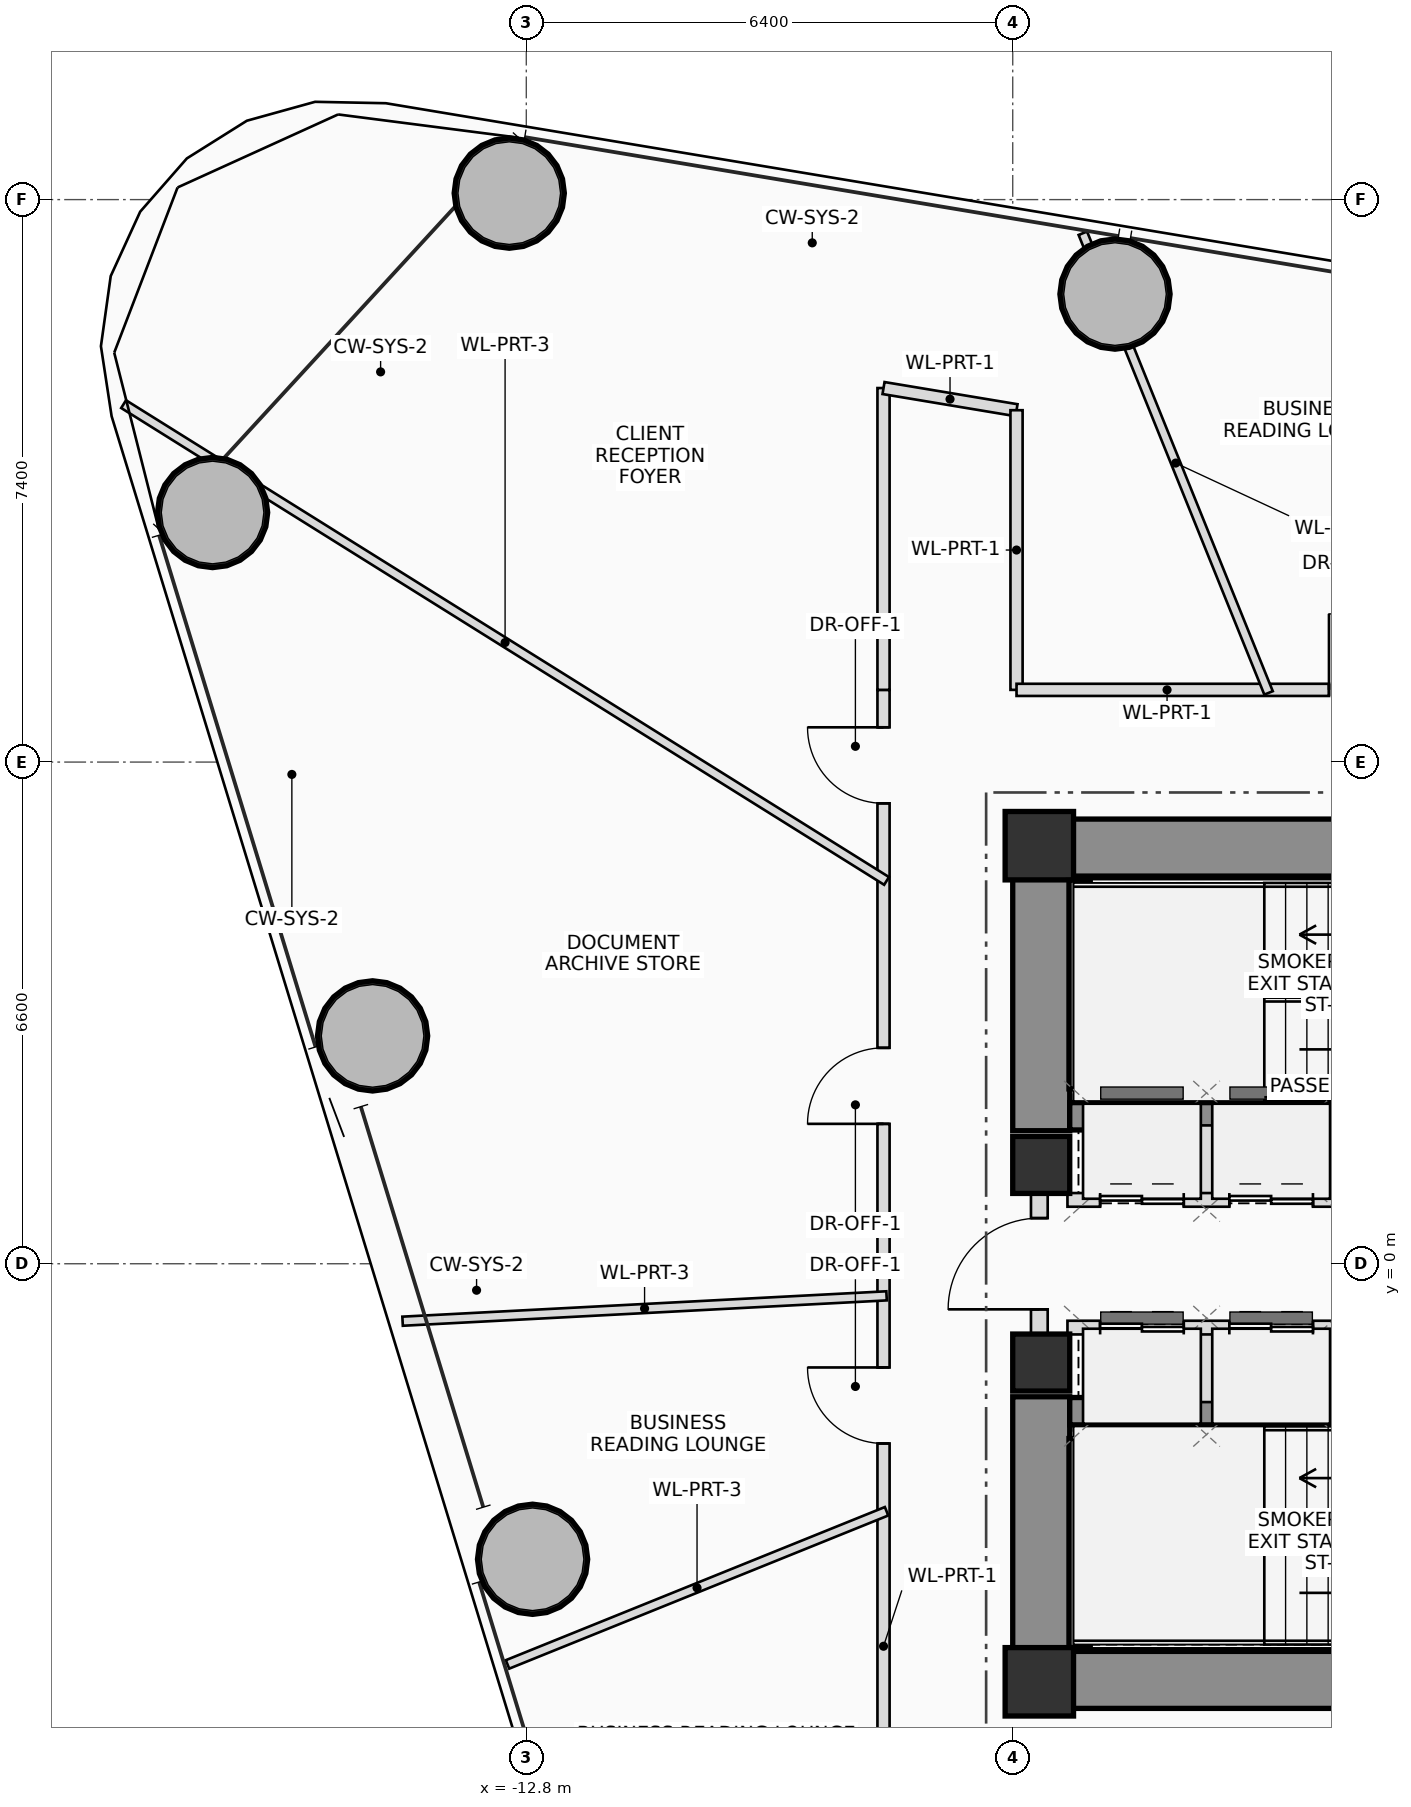
"""IFC4 building model, lengths in metres.
Left out: names, types, materials, properties, quantities, classifications, styles, units other than length and angle.
Written with IfcOpenShell. Run it as: python <this file> out.ifc"""

import sys

from ifc_helpers import new_model, si_unit, direction, frame, frame_2d, origin, origin_2d, place, context, subcontext, project, spatial, rectangle, hollow_circle, extrude, source, transform, mapped, element, fill, save


model = new_model("IFC4")
c1 = context("Model", 3, precision=1e-05, world=origin(), true_north=direction((0.0, 1.0)))
c2 = subcontext(c1, "Body", "Model", "MODEL_VIEW")
j1 = project(units=[si_unit("LENGTHUNIT", "METRE"), si_unit("PLANEANGLEUNIT", "RADIAN")], contexts=[c1])
p1 = place(None, origin())
s1 = spatial("IfcSite", under=j1, at=p1, CompositionType="ELEMENT")
p2 = place(p1, origin())
s2 = spatial("IfcBuilding", under=s1, at=p2, CompositionType="ELEMENT")
p3 = place(p2, frame((0.0, 0.0, 108.65)))
s3 = spatial("IfcBuildingStorey", under=s2, at=p3, CompositionType="ELEMENT", Elevation=108.65)
m1 = source(origin(), c2, "Body", "SweptSolid", [
    extrude(rectangle(XDim=0.9, YDim=0.9, at=origin_2d()), origin(), (0.0, 0.0, 1.0), 3.75),
])
for number, where, z_axis, x_axis in (
    (1, (-6.05, -5.5, 0.0), (0.0, 0.0, 1.0), (1.0, 0.0, 0.0)),
    (2, (-6.05, 5.5, 0.0), (0.0, 0.0, 1.0), (1.0, 0.0, 0.0)),
):
    element("IfcColumn", number, at=place(p3, frame(where, z_axis=z_axis, x_axis=x_axis)), inside=s3, PredefinedType="COLUMN", context=c2, shape_type="MappedRepresentation", body=[
        mapped(m1, transform((0.0, 0.0, 0.0), scale=1.0)),
    ])
p4 = place(p3, frame((-6.4, 5.475, 0.0), z_axis=(0.0, 0.0, 1.0), x_axis=(1.0, 0.0, 0.0)))
e3 = element("IfcWall", 3, at=p4, inside=s3, PredefinedType="SHEAR", context=c2, shape_type="SweptSolid", body=[
    extrude(rectangle(XDim=12.8, YDim=0.75, at=frame_2d((6.4, 0.0))), origin(), (0.0, 0.0, 1.0), 3.75),
])
p5 = place(p4, frame((8.6, 0.0, 0.0)))
e4 = element("IfcOpeningElement", 4, at=p5, cuts=e3, PredefinedType="OPENING", context=c2, shape_type="SweptSolid", body=[
    extrude(rectangle(XDim=1.2, YDim=2.2, at=frame_2d((0.6, 1.1))), frame((0.0, 0.385, 0.0), z_axis=(0.0, -1.0, 0.0), x_axis=(1.0, 0.0, 0.0)), (0.0, 0.0, 1.0), 0.77),
])
p6 = place(p3, frame((-6.4, -5.475, 0.0), z_axis=(0.0, 0.0, 1.0), x_axis=(1.0, 0.0, 0.0)))
e5 = element("IfcWall", 5, at=p6, inside=s3, PredefinedType="SHEAR", context=c2, shape_type="SweptSolid", body=[
    extrude(rectangle(XDim=12.8, YDim=0.75, at=frame_2d((6.4, 0.0))), origin(), (0.0, 0.0, 1.0), 3.75),
])
p7 = place(p6, frame((8.6, 0.0, 0.0)))
e6 = element("IfcOpeningElement", 6, at=p7, cuts=e5, PredefinedType="OPENING", context=c2, shape_type="SweptSolid", body=[
    extrude(rectangle(XDim=1.2, YDim=2.2, at=frame_2d((0.6, 1.1))), frame((0.0, 0.385, 0.0), z_axis=(0.0, -1.0, 0.0), x_axis=(1.0, 0.0, 0.0)), (0.0, 0.0, 1.0), 0.77),
])
for number, where, z_axis, x_axis in (
    (7, (-6.025, -5.1, 0.0), (0.0, 0.0, 1.0), (0.0, 1.0, 0.0)),
    (8, (-6.025, 1.75, 0.0), (0.0, 0.0, 1.0), (0.0, 1.0, 0.0)),
):
    element("IfcWall", number, at=place(p3, frame(where, z_axis=z_axis, x_axis=x_axis)), inside=s3, PredefinedType="SHEAR", context=c2, shape_type="SweptSolid", body=[
        extrude(rectangle(XDim=3.35, YDim=0.75, at=frame_2d((1.675, 0.0))), origin(), (0.0, 0.0, 1.0), 3.75),
    ])
for number, where, z_axis, x_axis in (
    (9, (-5.65, 1.94, 0.0), (0.0, 0.0, 1.0), (1.0, 0.0, 0.0)),
    (10, (-5.65, -1.94, 0.0), (0.0, 0.0, 1.0), (1.0, 0.0, 0.0)),
):
    element("IfcWall", number, at=place(p3, frame(where, z_axis=z_axis, x_axis=x_axis)), inside=s3, PredefinedType="SHEAR", context=c2, shape_type="SweptSolid", body=[
        extrude(rectangle(XDim=11.3, YDim=0.36, at=frame_2d((5.65, 0.0))), origin(), (0.0, 0.0, 1.0), 3.75),
    ])
for number, where, z_axis, x_axis in (
    (11, (-5.52, 2.3, 0.0), (0.0, 0.0, 1.0), (0.0, 1.0, 0.0)),
    (12, (-5.52, -5.05, 0.0), (0.0, 0.0, 1.0), (0.0, 1.0, 0.0)),
):
    element("IfcWall", number, at=place(p3, frame(where, z_axis=z_axis, x_axis=x_axis)), inside=s3, PredefinedType="SHEAR", context=c2, shape_type="SweptSolid", body=[
        extrude(rectangle(XDim=2.75, YDim=0.28, at=frame_2d((1.375, 0.0))), origin(), (0.0, 0.0, 1.0), 3.75),
    ])
m2 = source(origin(), c2, "Body", "SweptSolid", [
    extrude(rectangle(XDim=0.75, YDim=0.75, at=origin_2d()), origin(), (0.0, 0.0, 1.0), 3.75),
])
for number, where, z_axis, x_axis in (
    (13, (-6.025, -1.3, 0.0), (0.0, 0.0, 1.0), (1.0, 0.0, 0.0)),
    (14, (-6.025, 1.3, 0.0), (0.0, 0.0, 1.0), (1.0, 0.0, 0.0)),
):
    element("IfcColumn", number, at=place(p3, frame(where, z_axis=z_axis, x_axis=x_axis)), inside=s3, PredefinedType="COLUMN", context=c2, shape_type="MappedRepresentation", body=[
        mapped(m2, transform((0.0, 0.0, 0.0), scale=1.0)),
    ])
m3 = source(origin(), c2, "Body", "SweptSolid", [
    extrude(hollow_circle(Radius=0.725, WallThickness=0.05, at=origin_2d()), origin(), (0.0, 0.0, 1.0), 3.75),
])
for number, where, z_axis, x_axis in (
    (15, (-5.054, 12.757, 0.0), (0.0, 0.0, 1.0), (1.0, 0.0, 0.0)),
    (16, (-13.024, 14.085, 0.0), (0.0, 0.0, 1.0), (1.0, 0.0, 0.0)),
    (17, (-16.927, 9.883, 0.0), (0.0, 0.0, 1.0), (1.0, 0.0, 0.0)),
    (18, (-14.823, 2.998, 0.0), (0.0, 0.0, 1.0), (1.0, 0.0, 0.0)),
    (19, (-12.717, -3.888, 0.0), (0.0, 0.0, 1.0), (1.0, 0.0, 0.0)),
):
    element("IfcColumn", number, at=place(p3, frame(where, z_axis=z_axis, x_axis=x_axis)), inside=s3, PredefinedType="COLUMN", context=c2, shape_type="MappedRepresentation", body=[
        mapped(m3, transform((0.0, 0.0, 0.0), scale=1.0)),
    ])
p8 = place(p3, frame((-6.05, -0.95, 0.0), z_axis=(0.0, 0.0, 1.0), x_axis=(0.0, 1.0, 0.0)))
e20 = element("IfcWall", 20, at=p8, inside=s3, PredefinedType="PLUMBINGWALL", context=c2, shape_type="SweptSolid", body=[
    extrude(rectangle(XDim=1.9, YDim=0.22, at=frame_2d((0.95, 0.0))), origin(), (0.0, 0.0, 1.0), 2.525),
])
p9 = place(p8, frame((0.35, 0.0, 0.0)))
e21 = element("IfcOpeningElement", 21, at=p9, cuts=e20, PredefinedType="OPENING", context=c2, shape_type="SweptSolid", body=[
    extrude(rectangle(XDim=1.2, YDim=2.2, at=frame_2d((0.6, 1.1))), frame((0.0, 0.12, 0.0), z_axis=(0.0, -1.0, 0.0), x_axis=(1.0, 0.0, 0.0)), (0.0, 0.0, 1.0), 0.24),
])
for number, where, z_axis, x_axis in (
    (22, (-3.85, 0.84, 0.0), (0.0, 0.0, 1.0), (0.0, 1.0, 0.0)),
    (23, (-3.85, -1.82, 0.0), (0.0, 0.0, 1.0), (0.0, 1.0, 0.0)),
):
    element("IfcWall", number, at=place(p3, frame(where, z_axis=z_axis, x_axis=x_axis)), inside=s3, PredefinedType="PLUMBINGWALL", context=c2, shape_type="SweptSolid", body=[
        extrude(rectangle(XDim=0.98, YDim=0.18, at=frame_2d((0.49, 0.0))), origin(), (0.0, 0.0, 1.0), 3.545),
    ])
p10 = place(p3, frame((-5.68, 0.84, 0.0), z_axis=(0.0, 0.0, 1.0), x_axis=(1.0, 0.0, 0.0)))
e24 = element("IfcWall", 24, at=p10, inside=s3, PredefinedType="PLUMBINGWALL", context=c2, shape_type="SweptSolid", body=[
    extrude(rectangle(XDim=11.33, YDim=0.18, at=frame_2d((5.665, 0.0))), origin(), (0.0, 0.0, 1.0), 3.545),
])
p11 = place(p10, frame((0.43, 0.0, 0.0)))
e25 = element("IfcOpeningElement", 25, at=p11, cuts=e24, PredefinedType="OPENING", context=c2, shape_type="SweptSolid", body=[
    extrude(rectangle(XDim=1.1, YDim=2.2, at=frame_2d((0.55, 1.1))), frame((0.0, 0.1, 0.0), z_axis=(0.0, -1.0, 0.0), x_axis=(1.0, 0.0, 0.0)), (0.0, 0.0, 1.0), 0.2),
])
p12 = place(p10, frame((2.13, 0.0, 0.0)))
e26 = element("IfcOpeningElement", 26, at=p12, cuts=e24, PredefinedType="OPENING", context=c2, shape_type="SweptSolid", body=[
    extrude(rectangle(XDim=1.1, YDim=2.2, at=frame_2d((0.55, 1.1))), frame((0.0, 0.1, 0.0), z_axis=(0.0, -1.0, 0.0), x_axis=(1.0, 0.0, 0.0)), (0.0, 0.0, 1.0), 0.2),
])
p13 = place(p10, frame((10.25, 0.0, 0.0)))
e27 = element("IfcOpeningElement", 27, at=p13, cuts=e24, PredefinedType="OPENING", context=c2, shape_type="SweptSolid", body=[
    extrude(rectangle(XDim=0.9, YDim=2.05, at=frame_2d((0.45, 1.025))), frame((0.0, 0.1, 0.0), z_axis=(0.0, -1.0, 0.0), x_axis=(1.0, 0.0, 0.0)), (0.0, 0.0, 1.0), 0.2),
])
p14 = place(p3, frame((-5.68, -0.84, 0.0), z_axis=(0.0, 0.0, 1.0), x_axis=(1.0, 0.0, 0.0)))
e28 = element("IfcWall", 28, at=p14, inside=s3, PredefinedType="PLUMBINGWALL", context=c2, shape_type="SweptSolid", body=[
    extrude(rectangle(XDim=11.33, YDim=0.18, at=frame_2d((5.665, 0.0))), origin(), (0.0, 0.0, 1.0), 3.545),
])
p15 = place(p14, frame((0.43, 0.0, 0.0)))
e29 = element("IfcOpeningElement", 29, at=p15, cuts=e28, PredefinedType="OPENING", context=c2, shape_type="SweptSolid", body=[
    extrude(rectangle(XDim=1.1, YDim=2.2, at=frame_2d((0.55, 1.1))), frame((0.0, 0.1, 0.0), z_axis=(0.0, -1.0, 0.0), x_axis=(1.0, 0.0, 0.0)), (0.0, 0.0, 1.0), 0.2),
])
p16 = place(p14, frame((2.13, 0.0, 0.0)))
e30 = element("IfcOpeningElement", 30, at=p16, cuts=e28, PredefinedType="OPENING", context=c2, shape_type="SweptSolid", body=[
    extrude(rectangle(XDim=1.1, YDim=2.2, at=frame_2d((0.55, 1.1))), frame((0.0, 0.1, 0.0), z_axis=(0.0, -1.0, 0.0), x_axis=(1.0, 0.0, 0.0)), (0.0, 0.0, 1.0), 0.2),
])
p17 = place(p14, frame((9.58, 0.0, 0.0)))
e31 = element("IfcOpeningElement", 31, at=p17, cuts=e28, PredefinedType="OPENING", context=c2, shape_type="SweptSolid", body=[
    extrude(rectangle(XDim=0.9, YDim=2.05, at=frame_2d((0.45, 1.025))), frame((0.0, 0.1, 0.0), z_axis=(0.0, -1.0, 0.0), x_axis=(1.0, 0.0, 0.0)), (0.0, 0.0, 1.0), 0.2),
])
p18 = place(p3, frame((-8.1, -7.55, 0.0), z_axis=(0.0, 0.0, 1.0), x_axis=(0.0, 1.0, 0.0)))
e32 = element("IfcWall", 32, at=p18, inside=s3, PredefinedType="PARTITIONING", context=c2, shape_type="SweptSolid", body=[
    extrude(rectangle(XDim=15.1, YDim=0.16, at=frame_2d((7.55, 0.0))), origin(), (0.0, 0.0, 1.0), 2.85),
])
p19 = place(p18, frame((5.185, 0.0, 0.0)))
e33 = element("IfcOpeningElement", 33, at=p19, cuts=e32, PredefinedType="OPENING", context=c2, shape_type="SweptSolid", body=[
    extrude(rectangle(XDim=1.0, YDim=2.25, at=frame_2d((0.5, 1.125))), frame((0.0, 0.09, 0.0), z_axis=(0.0, -1.0, 0.0), x_axis=(1.0, 0.0, 0.0)), (0.0, 0.0, 1.0), 0.18),
])
p20 = place(p18, frame((9.39, 0.0, 0.0)))
e34 = element("IfcOpeningElement", 34, at=p20, cuts=e32, PredefinedType="OPENING", context=c2, shape_type="SweptSolid", body=[
    extrude(rectangle(XDim=1.0, YDim=2.25, at=frame_2d((0.5, 1.125))), frame((0.0, 0.09, 0.0), z_axis=(0.0, -1.0, 0.0), x_axis=(1.0, 0.0, 0.0)), (0.0, 0.0, 1.0), 0.18),
])
p21 = place(p18, frame((13.607, 0.0, 0.0)))
e35 = element("IfcOpeningElement", 35, at=p21, cuts=e32, PredefinedType="OPENING", context=c2, shape_type="SweptSolid", body=[
    extrude(rectangle(XDim=1.0, YDim=2.25, at=frame_2d((0.5, 1.125))), frame((0.0, 0.09, 0.0), z_axis=(0.0, -1.0, 0.0), x_axis=(1.0, 0.0, 0.0)), (0.0, 0.0, 1.0), 0.18),
])
p22 = place(p3, frame((-8.1, 7.55, 0.0), z_axis=(0.0, 0.0, 1.0), x_axis=(0.0, 1.0, 0.0)))
e36 = element("IfcWall", 36, at=p22, inside=s3, PredefinedType="PARTITIONING", context=c2, shape_type="SweptSolid", body=[
    extrude(rectangle(XDim=3.971, YDim=0.16, at=frame_2d((1.985, 0.0))), origin(), (0.0, 0.0, 1.0), 2.85),
])
p23 = place(p3, frame((-8.1, 11.521, 0.0), z_axis=(0.0, 0.0, 1.0), x_axis=(0.986408796856, -0.164309724253, 0.0)))
e37 = element("IfcWall", 37, at=p23, inside=s3, PredefinedType="PARTITIONING", context=c2, shape_type="SweptSolid", body=[
    extrude(rectangle(XDim=1.774, YDim=0.16, at=frame_2d((0.887, 0.0))), origin(), (0.0, 0.0, 1.0), 3.545),
])
p24 = place(p3, frame((-6.35, 11.229, 0.0), z_axis=(0.0, 0.0, 1.0), x_axis=(0.0, -1.0, 0.0)))
e38 = element("IfcWall", 38, at=p24, inside=s3, PredefinedType="PARTITIONING", context=c2, shape_type="SweptSolid", body=[
    extrude(rectangle(XDim=3.679, YDim=0.16, at=frame_2d((1.84, 0.0))), origin(), (0.0, 0.0, 1.0), 3.05),
])
p25 = place(p3, frame((-6.35, 7.55, 0.0), z_axis=(0.0, 0.0, 1.0), x_axis=(1.0, 0.0, 0.0)))
e39 = element("IfcWall", 39, at=p25, inside=s3, PredefinedType="PARTITIONING", context=c2, shape_type="SweptSolid", body=[
    extrude(rectangle(XDim=12.7, YDim=0.16, at=frame_2d((6.35, 0.0))), origin(), (0.0, 0.0, 1.0), 2.85),
])
p26 = place(p25, frame((4.111, 0.0, 0.0)))
e40 = element("IfcOpeningElement", 40, at=p26, cuts=e39, PredefinedType="OPENING", context=c2, shape_type="SweptSolid", body=[
    extrude(rectangle(XDim=1.0, YDim=2.25, at=frame_2d((0.5, 1.125))), frame((0.0, 0.09, 0.0), z_axis=(0.0, -1.0, 0.0), x_axis=(1.0, 0.0, 0.0)), (0.0, 0.0, 1.0), 0.18),
])
p27 = place(p25, frame((8.632, 0.0, 0.0)))
e41 = element("IfcOpeningElement", 41, at=p27, cuts=e39, PredefinedType="OPENING", context=c2, shape_type="SweptSolid", body=[
    extrude(rectangle(XDim=1.0, YDim=2.25, at=frame_2d((0.5, 1.125))), frame((0.0, 0.09, 0.0), z_axis=(0.0, -1.0, 0.0), x_axis=(1.0, 0.0, 0.0)), (0.0, 0.0, 1.0), 0.18),
])
p28 = place(p3, frame((-8.06, -0.422, 0.0), z_axis=(0.0, 0.0, 1.0), x_axis=(-0.998629334036, -0.052339786045, 0.0)))
e42 = element("IfcWall", 42, at=p28, inside=s3, PredefinedType="PARTITIONING", context=c2, shape_type="SweptSolid", body=[
    extrude(rectangle(XDim=6.376, YDim=0.12, at=frame_2d((3.188, 0.0))), origin(), (0.0, 0.0, 1.0), 3.01),
])
p29 = place(p3, frame((-8.06, -3.257, 0.0), z_axis=(0.0, 0.0, 1.0), x_axis=(-0.927184543748, -0.374604887627, 0.0)))
e43 = element("IfcWall", 43, at=p29, inside=s3, PredefinedType="PARTITIONING", context=c2, shape_type="SweptSolid", body=[
    extrude(rectangle(XDim=5.379, YDim=0.12, at=frame_2d((2.689, 0.0))), origin(), (0.0, 0.0, 1.0), 2.85),
])
p30 = place(p3, frame((-3.034, 7.51, 0.0), z_axis=(0.0, 0.0, 1.0), x_axis=(-0.37460229318, 0.927185591963, 0.0)))
e44 = element("IfcWall", 44, at=p30, inside=s3, PredefinedType="PARTITIONING", context=c2, shape_type="SweptSolid", body=[
    extrude(rectangle(XDim=6.522, YDim=0.12, at=frame_2d((3.261, 0.0))), origin(), (0.0, 0.0, 1.0), 3.05),
])
p31 = place(p3, frame((-8.06, 5.036, 0.0), z_axis=(0.0, 0.0, 1.0), x_axis=(-0.848040015969, 0.529932195016, 0.0)))
e45 = element("IfcWall", 45, at=p31, inside=s3, PredefinedType="PARTITIONING", context=c2, shape_type="SweptSolid", body=[
    extrude(rectangle(XDim=11.837, YDim=0.12, at=frame_2d((5.918, 0.0))), origin(), (0.0, 0.0, 1.0), 2.85),
])
p32 = place(p9, origin())
e46 = element("IfcDoor", 46, at=p32, inside=s3, OperationType="SINGLE_SWING_LEFT", PredefinedType="DOOR", context=c2, shape_type="SweptSolid", body=[
    extrude(rectangle(XDim=1.2, YDim=2.2, at=frame_2d((0.6, 1.1))), frame((0.0, 0.025, 0.0), z_axis=(0.0, -1.0, 0.0), x_axis=(1.0, 0.0, 0.0)), (0.0, 0.0, 1.0), 0.05),
])
fill(e21, e46)
p33 = place(p11, origin())
e47 = element("IfcDoor", 47, at=p33, inside=s3, OperationType="DOUBLE_DOOR_SLIDING", PredefinedType="DOOR", context=c2, shape_type="SweptSolid", body=[
    extrude(rectangle(XDim=1.1, YDim=2.2, at=frame_2d((0.55, 1.1))), frame((0.0, 0.025, 0.0), z_axis=(0.0, -1.0, 0.0), x_axis=(1.0, 0.0, 0.0)), (0.0, 0.0, 1.0), 0.05),
])
fill(e25, e47)
p34 = place(p12, origin())
e48 = element("IfcDoor", 48, at=p34, inside=s3, OperationType="DOUBLE_DOOR_SLIDING", PredefinedType="DOOR", context=c2, shape_type="SweptSolid", body=[
    extrude(rectangle(XDim=1.1, YDim=2.2, at=frame_2d((0.55, 1.1))), frame((0.0, 0.025, 0.0), z_axis=(0.0, -1.0, 0.0), x_axis=(1.0, 0.0, 0.0)), (0.0, 0.0, 1.0), 0.05),
])
fill(e26, e48)
p35 = place(p15, origin())
e49 = element("IfcDoor", 49, at=p35, inside=s3, OperationType="DOUBLE_DOOR_SLIDING", PredefinedType="DOOR", context=c2, shape_type="SweptSolid", body=[
    extrude(rectangle(XDim=1.1, YDim=2.2, at=frame_2d((0.55, 1.1))), frame((0.0, 0.025, 0.0), z_axis=(0.0, -1.0, 0.0), x_axis=(1.0, 0.0, 0.0)), (0.0, 0.0, 1.0), 0.05),
])
fill(e29, e49)
p36 = place(p16, origin())
e50 = element("IfcDoor", 50, at=p36, inside=s3, OperationType="DOUBLE_DOOR_SLIDING", PredefinedType="DOOR", context=c2, shape_type="SweptSolid", body=[
    extrude(rectangle(XDim=1.1, YDim=2.2, at=frame_2d((0.55, 1.1))), frame((0.0, 0.025, 0.0), z_axis=(0.0, -1.0, 0.0), x_axis=(1.0, 0.0, 0.0)), (0.0, 0.0, 1.0), 0.05),
])
fill(e30, e50)
p37 = place(p19, origin())
e51 = element("IfcDoor", 51, at=p37, inside=s3, OperationType="SINGLE_SWING_RIGHT", PredefinedType="DOOR", context=c2, shape_type="SweptSolid", body=[
    extrude(rectangle(XDim=1.0, YDim=2.25, at=frame_2d((0.5, 1.125))), frame((0.0, 0.025, 0.0), z_axis=(0.0, -1.0, 0.0), x_axis=(1.0, 0.0, 0.0)), (0.0, 0.0, 1.0), 0.05),
])
fill(e33, e51)
p38 = place(p20, origin())
e52 = element("IfcDoor", 52, at=p38, inside=s3, OperationType="SINGLE_SWING_LEFT", PredefinedType="DOOR", context=c2, shape_type="SweptSolid", body=[
    extrude(rectangle(XDim=1.0, YDim=2.25, at=frame_2d((0.5, 1.125))), frame((0.0, 0.025, 0.0), z_axis=(0.0, -1.0, 0.0), x_axis=(1.0, 0.0, 0.0)), (0.0, 0.0, 1.0), 0.05),
])
fill(e34, e52)
p39 = place(p21, origin())
e53 = element("IfcDoor", 53, at=p39, inside=s3, OperationType="SINGLE_SWING_RIGHT", PredefinedType="DOOR", context=c2, shape_type="SweptSolid", body=[
    extrude(rectangle(XDim=1.0, YDim=2.25, at=frame_2d((0.5, 1.125))), frame((0.0, 0.025, 0.0), z_axis=(0.0, -1.0, 0.0), x_axis=(1.0, 0.0, 0.0)), (0.0, 0.0, 1.0), 0.05),
])
fill(e35, e53)
p40 = place(p26, origin())
e54 = element("IfcDoor", 54, at=p40, inside=s3, OperationType="SINGLE_SWING_LEFT", PredefinedType="DOOR", context=c2, shape_type="SweptSolid", body=[
    extrude(rectangle(XDim=1.0, YDim=2.25, at=frame_2d((0.5, 1.125))), frame((0.0, 0.025, 0.0), z_axis=(0.0, -1.0, 0.0), x_axis=(1.0, 0.0, 0.0)), (0.0, 0.0, 1.0), 0.05),
])
fill(e40, e54)
save(model, sys.argv[1])
